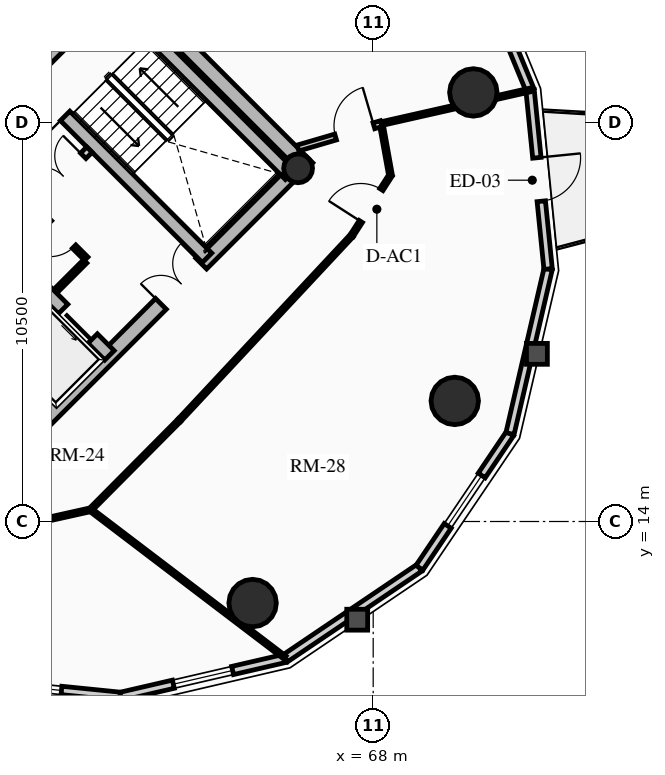
"""IFC4 building model, lengths in metres.
Left out: names, types, materials, properties, quantities, classifications, styles, units other than length and angle.
Written with IfcOpenShell. Run it as: python <this file> out.ifc"""

import sys

from ifc_helpers import new_model, si_unit, direction, frame, frame_2d, origin, origin_2d, place, context, subcontext, project, spatial, rectangle, circle, hollow_circle, extrude, source, transform, mapped, element, fill, save


model = new_model("IFC4")
c1 = context("Model", 3, precision=1e-05, world=origin(), true_north=direction((0.0, 1.0)))
c2 = subcontext(c1, "Body", "Model", "MODEL_VIEW")
j1 = project(units=[si_unit("LENGTHUNIT", "METRE"), si_unit("PLANEANGLEUNIT", "RADIAN")], contexts=[c1])
p1 = place(None, origin())
s1 = spatial("IfcSite", under=j1, at=p1, CompositionType="ELEMENT")
p2 = place(p1, origin())
s2 = spatial("IfcBuilding", under=s1, at=p2, CompositionType="ELEMENT")
p3 = place(p2, frame((0.0, 0.0, 189.43)))
s3 = spatial("IfcBuildingStorey", under=s2, at=p3, CompositionType="ELEMENT", Elevation=189.43)
p4 = place(p3, frame((66.268, 23.298, 0.0), z_axis=(0.0, 0.0, 1.0), x_axis=(-0.707106781187, 0.707106781187, 0.0)))
e1 = element("IfcWall", 1, at=p4, inside=s3, PredefinedType="SHEAR", context=c2, shape_type="SweptSolid", body=[
    extrude(rectangle(XDim=14.1, YDim=0.4, at=frame_2d((7.05, 0.0))), origin(), (0.0, 0.0, 1.0), 2.91),
])
p5 = place(p3, frame((58.561, 15.873, 0.0), z_axis=(0.0, 0.0, 1.0), x_axis=(0.707106781187, 0.707106781187, 0.0)))
e2 = element("IfcWall", 2, at=p5, inside=s3, PredefinedType="SHEAR", context=c2, shape_type="SweptSolid", body=[
    extrude(rectangle(XDim=10.7, YDim=0.4, at=frame_2d((5.35, 0.0))), origin(), (0.0, 0.0, 1.0), 2.91),
])
m1 = source(origin(), c2, "Body", "SweptSolid", [
    extrude(rectangle(XDim=1.5, YDim=2.02, at=frame_2d((0.75, 1.01))), frame((0.0, 0.21, 0.0), z_axis=(0.0, -1.0, 0.0), x_axis=(1.0, 0.0, 0.0)), (0.0, 0.0, 1.0), 0.42),
])
p6 = place(p5, frame((5.45, 0.0, 0.0)))
e3 = element("IfcOpeningElement", 3, at=p6, cuts=e2, PredefinedType="OPENING", context=c2, shape_type="MappedRepresentation", body=[
    mapped(m1, transform((0.0, 0.0, 0.0), x_axis=(1.0, 0.0, 0.0), y_axis=(0.0, 1.0, 0.0), z_axis=(0.0, 0.0, 1.0), scale=1.0)),
])
p7 = place(p3, frame((61.06, 18.373, 0.0), z_axis=(0.0, 0.0, 1.0), x_axis=(-0.707106781187, 0.707106781187, 0.0)))
e4 = element("IfcWall", 4, at=p7, inside=s3, PredefinedType="SHEAR", context=c2, shape_type="SweptSolid", body=[
    extrude(rectangle(XDim=13.7, YDim=0.35, at=frame_2d((6.85, 0.0))), origin(), (0.0, 0.0, 1.0), 2.91),
])
m2 = source(origin(), c2, "Body", "SweptSolid", [
    extrude(rectangle(XDim=1.1, YDim=2.015, at=frame_2d((0.55, 1.007))), frame((0.0, 0.185, 0.0), z_axis=(0.0, -1.0, 0.0), x_axis=(1.0, 0.0, 0.0)), (0.0, 0.0, 1.0), 0.37),
])
p8 = place(p7, frame((4.85, 0.0, 0.0)))
e5 = element("IfcOpeningElement", 5, at=p8, cuts=e4, PredefinedType="OPENING", context=c2, shape_type="MappedRepresentation", body=[
    mapped(m2, transform((0.0, 0.0, 0.0), x_axis=(1.0, 0.0, 0.0), y_axis=(0.0, 1.0, 0.0), z_axis=(0.0, 0.0, 1.0), scale=1.0)),
])
p9 = place(p7, frame((0.625, 0.0, 0.0)))
e6 = element("IfcOpeningElement", 6, at=p9, cuts=e4, PredefinedType="OPENING", context=c2, shape_type="MappedRepresentation", body=[
    mapped(m2, transform((0.0, 0.0, 0.0), x_axis=(1.0, 0.0, 0.0), y_axis=(0.0, 1.0, 0.0), z_axis=(0.0, 0.0, 1.0), scale=1.0)),
])
p10 = place(p7, frame((2.625, 0.0, 0.0)))
e7 = element("IfcOpeningElement", 7, at=p10, cuts=e4, PredefinedType="OPENING", context=c2, shape_type="MappedRepresentation", body=[
    mapped(m2, transform((0.0, 0.0, 0.0), x_axis=(1.0, 0.0, 0.0), y_axis=(0.0, 1.0, 0.0), z_axis=(0.0, 0.0, 1.0), scale=1.0)),
])
m3 = source(origin(), c2, "Body", "SweptSolid", [
    extrude(rectangle(XDim=1.15, YDim=2.02, at=frame_2d((0.575, 1.01))), frame((0.0, 0.185, 0.0), z_axis=(0.0, -1.0, 0.0), x_axis=(1.0, 0.0, 0.0)), (0.0, 0.0, 1.0), 0.37),
])
p11 = place(p7, frame((7.27, 0.0, 0.0)))
e8 = element("IfcOpeningElement", 8, at=p11, cuts=e4, PredefinedType="OPENING", context=c2, shape_type="MappedRepresentation", body=[
    mapped(m3, transform((0.0, 0.0, 0.0), x_axis=(1.0, 0.0, 0.0), y_axis=(0.0, 1.0, 0.0), z_axis=(0.0, 0.0, 1.0), scale=1.0)),
])
p12 = place(p3, frame((63.627, 20.94, 0.0), z_axis=(0.0, 0.0, 1.0), x_axis=(-0.707119496762, 0.707094065383, 0.0)))
e9 = element("IfcWall", 9, at=p12, inside=s3, PredefinedType="SHEAR", context=c2, shape_type="SweptSolid", body=[
    extrude(rectangle(XDim=9.6, YDim=0.35, at=frame_2d((4.8, 0.0))), origin(), (0.0, 0.0, 1.0), 2.91),
])
p13 = place(p12, frame((5.28, 0.0, 0.0)))
e10 = element("IfcOpeningElement", 10, at=p13, cuts=e9, PredefinedType="OPENING", context=c2, shape_type="MappedRepresentation", body=[
    mapped(m3, transform((0.0, 0.0, 0.0), x_axis=(1.0, 0.0, 0.0), y_axis=(0.0, 1.0, 0.0), z_axis=(0.0, 0.0, 1.0), scale=1.0)),
])
p14 = place(p3, frame((65.812, 23.125, 0.0), z_axis=(0.0, 0.0, 1.0), x_axis=(-0.707106781187, 0.707106781187, 0.0)))
e11 = element("IfcWall", 11, at=p14, inside=s3, PredefinedType="SHEAR", context=c2, shape_type="SweptSolid", body=[
    extrude(rectangle(XDim=6.695, YDim=0.35, at=frame_2d((3.348, 0.0))), origin(), (0.0, 0.0, 1.0), 2.91),
])
p15 = place(p3, frame((58.893, 25.674, 0.0), z_axis=(0.0, 0.0, 1.0), x_axis=(0.707106781187, 0.707106781187, 0.0)))
e12 = element("IfcWall", 12, at=p15, inside=s3, PredefinedType="SHEAR", context=c2, shape_type="SweptSolid", body=[
    extrude(rectangle(XDim=3.285, YDim=0.35, at=frame_2d((1.643, 0.0))), origin(), (0.0, 0.0, 1.0), 2.91),
])
p16 = place(p3, frame((66.024, 23.294, 0.0), z_axis=(0.0, 0.0, 1.0), x_axis=(0.707106781187, 0.707106781187, 0.0)))
e13 = element("IfcColumn", 13, at=p16, inside=s3, PredefinedType="COLUMN", context=c2, shape_type="SweptSolid", body=[
    extrude(hollow_circle(Radius=0.38, WallThickness=0.032, at=origin_2d()), origin(), (0.0, 0.0, 1.0), 2.91),
])
for number, where, z_axis, x_axis in (
    (14, (64.827, 11.854, 0.0), (0.0, 0.0, 1.0), (1.0, 0.0, 0.0)),
    (15, (70.146, 17.173, 0.0), (0.0, 0.0, 1.0), (1.0, 0.0, 0.0)),
    (16, (70.635, 25.291, 0.0), (0.0, 0.0, 1.0), (1.0, 0.0, 0.0)),
):
    element("IfcColumn", number, at=place(p3, frame(where, z_axis=z_axis, x_axis=x_axis)), inside=s3, PredefinedType="USERDEFINED", context=c2, shape_type="SweptSolid", body=[
        extrude(circle(Radius=0.625, at=origin_2d()), origin(), (0.0, 0.0, 1.0), 2.91),
    ])
p17 = place(p3, frame((61.355, 9.397, 0.0), z_axis=(0.0, 0.0, 1.0), x_axis=(-0.994943283129, 0.100438356004, 0.0)))
e17 = element("IfcWall", 17, at=p17, inside=s3, PredefinedType="SOLIDWALL", context=c2, shape_type="SweptSolid", body=[
    extrude(rectangle(XDim=4.733, YDim=0.22, at=frame_2d((2.366, 0.0))), origin(), (0.0, 0.0, 1.0), 2.125),
])
m4 = source(origin(), c2, "Body", "SweptSolid", [
    extrude(rectangle(XDim=1.6, YDim=1.3, at=frame_2d((0.8, 0.65))), frame((0.0, 0.12, 0.0), z_axis=(0.0, -1.0, 0.0), x_axis=(1.0, 0.0, 0.0)), (0.0, 0.0, 1.0), 0.24),
])
p18 = place(p17, frame((1.566, 0.0, 0.65)))
e18 = element("IfcOpeningElement", 18, at=p18, cuts=e17, PredefinedType="OPENING", context=c2, shape_type="MappedRepresentation", body=[
    mapped(m4, transform((0.0, 0.0, 0.0), x_axis=(1.0, 0.0, 0.0), y_axis=(0.0, 1.0, 0.0), z_axis=(0.0, 0.0, 1.0), scale=1.0)),
])
p19 = place(p3, frame((65.687, 10.4, 0.0), z_axis=(0.0, 0.0, 1.0), x_axis=(-0.97422620202, -0.22557328587, 0.0)))
e19 = element("IfcWall", 19, at=p19, inside=s3, PredefinedType="SOLIDWALL", context=c2, shape_type="SweptSolid", body=[
    extrude(rectangle(XDim=4.446, YDim=0.22, at=frame_2d((2.223, 0.0))), origin(), (0.0, 0.0, 1.0), 2.125),
])
p20 = place(p19, frame((1.423, 0.0, 0.65)))
e20 = element("IfcOpeningElement", 20, at=p20, cuts=e19, PredefinedType="OPENING", context=c2, shape_type="MappedRepresentation", body=[
    mapped(m4, transform((0.0, 0.0, 0.0), x_axis=(1.0, 0.0, 0.0), y_axis=(0.0, 1.0, 0.0), z_axis=(0.0, 0.0, 1.0), scale=1.0)),
])
p21 = place(p3, frame((69.217, 12.783, 0.0), z_axis=(0.0, 0.0, 1.0), x_axis=(-0.828817439852, -0.55951912514, 0.0)))
e21 = element("IfcWall", 21, at=p21, inside=s3, PredefinedType="SOLIDWALL", context=c2, shape_type="SweptSolid", body=[
    extrude(rectangle(XDim=4.259, YDim=0.22, at=frame_2d((2.129, 0.0))), origin(), (0.0, 0.0, 1.0), 2.125),
])
p22 = place(p3, frame((71.6, 16.313, 0.0), z_axis=(0.0, 0.0, 1.0), x_axis=(-0.55951912514, -0.828817439852, 0.0)))
e22 = element("IfcWall", 22, at=p22, inside=s3, PredefinedType="SOLIDWALL", context=c2, shape_type="SweptSolid", body=[
    extrude(rectangle(XDim=4.259, YDim=0.22, at=frame_2d((2.129, 0.0))), origin(), (0.0, 0.0, 1.0), 2.125),
])
p23 = place(p22, frame((1.33, 0.0, 0.65)))
e23 = element("IfcOpeningElement", 23, at=p23, cuts=e22, PredefinedType="OPENING", context=c2, shape_type="MappedRepresentation", body=[
    mapped(m4, transform((0.0, 0.0, 0.0), x_axis=(1.0, 0.0, 0.0), y_axis=(0.0, 1.0, 0.0), z_axis=(0.0, 0.0, 1.0), scale=1.0)),
])
p24 = place(p3, frame((72.603, 20.645, 0.0), z_axis=(0.0, 0.0, 1.0), x_axis=(-0.22557328587, -0.97422620202, 0.0)))
e24 = element("IfcWall", 24, at=p24, inside=s3, PredefinedType="SOLIDWALL", context=c2, shape_type="SweptSolid", body=[
    extrude(rectangle(XDim=4.446, YDim=0.22, at=frame_2d((2.223, 0.0))), origin(), (0.0, 0.0, 1.0), 2.125),
])
p25 = place(p3, frame((72.127, 25.354, 0.0), z_axis=(0.0, 0.0, 1.0), x_axis=(0.100438356004, -0.994943283129, 0.0)))
e25 = element("IfcWall", 25, at=p25, inside=s3, PredefinedType="SOLIDWALL", context=c2, shape_type="SweptSolid", body=[
    extrude(rectangle(XDim=4.733, YDim=0.22, at=frame_2d((2.366, 0.0))), origin(), (0.0, 0.0, 1.0), 2.125),
])
m5 = source(origin(), c2, "Body", "SweptSolid", [
    extrude(rectangle(XDim=1.15, YDim=2.005, at=frame_2d((0.575, 1.002))), frame((0.0, 0.12, 0.0), z_axis=(0.0, -1.0, 0.0), x_axis=(1.0, 0.0, 0.0)), (0.0, 0.0, 1.0), 0.24),
])
p26 = place(p25, frame((1.791, 0.0, 0.0)))
e26 = element("IfcOpeningElement", 26, at=p26, cuts=e25, PredefinedType="OPENING", context=c2, shape_type="MappedRepresentation", body=[
    mapped(m5, transform((0.0, 0.0, 0.0), x_axis=(1.0, 0.0, 0.0), y_axis=(0.0, 1.0, 0.0), z_axis=(0.0, 0.0, 1.0), scale=1.0)),
])
p27 = place(p3, frame((70.22, 29.979, 0.0), z_axis=(0.0, 0.0, 1.0), x_axis=(0.381196434348, -0.924494066201, 0.0)))
e27 = element("IfcWall", 27, at=p27, inside=s3, PredefinedType="SOLIDWALL", context=c2, shape_type="SweptSolid", body=[
    extrude(rectangle(XDim=5.003, YDim=0.22, at=frame_2d((2.501, 0.0))), origin(), (0.0, 0.0, 1.0), 2.125),
])
p28 = place(p3, frame((58.214, 21.467, 0.0), z_axis=(0.0, 0.0, 1.0), x_axis=(0.707106781187, 0.707106781187, 0.0)))
e28 = element("IfcWall", 28, at=p28, inside=s3, PredefinedType="PARTITIONING", context=c2, shape_type="SweptSolid", body=[
    extrude(rectangle(XDim=3.28, YDim=0.2, at=frame_2d((1.64, 0.0))), origin(), (0.0, 0.0, 1.0), 2.555),
])
m6 = source(origin(), c2, "Body", "SweptSolid", [
    extrude(rectangle(XDim=1.5, YDim=2.02, at=frame_2d((0.75, 1.01))), frame((0.0, 0.11, 0.0), z_axis=(0.0, -1.0, 0.0), x_axis=(1.0, 0.0, 0.0)), (0.0, 0.0, 1.0), 0.22),
])
p29 = place(p28, frame((1.55, 0.0, 0.0)))
e29 = element("IfcOpeningElement", 29, at=p29, cuts=e28, PredefinedType="OPENING", context=c2, shape_type="MappedRepresentation", body=[
    mapped(m6, transform((0.0, 0.0, 0.0), x_axis=(1.0, 0.0, 0.0), y_axis=(0.0, 1.0, 0.0), z_axis=(0.0, 0.0, 1.0), scale=1.0)),
])
p30 = place(p3, frame((60.448, 20.915, 0.0), z_axis=(0.0, 0.0, 1.0), x_axis=(-0.707106781187, 0.707106781187, 0.0)))
e30 = element("IfcWall", 30, at=p30, inside=s3, PredefinedType="PARTITIONING", context=c2, shape_type="SweptSolid", body=[
    extrude(rectangle(XDim=1.87, YDim=0.125, at=frame_2d((0.935, 0.0))), origin(), (0.0, 0.0, 1.0), 2.555),
])
m7 = source(origin(), c2, "Body", "SweptSolid", [
    extrude(rectangle(XDim=0.9, YDim=2.005, at=frame_2d((0.45, 1.002))), frame((0.0, 0.073, 0.0), z_axis=(0.0, -1.0, 0.0), x_axis=(1.0, 0.0, 0.0)), (0.0, 0.0, 1.0), 0.145),
])
p31 = place(p30, frame((0.45, 0.0, 0.0)))
e31 = element("IfcOpeningElement", 31, at=p31, cuts=e30, PredefinedType="OPENING", context=c2, shape_type="MappedRepresentation", body=[
    mapped(m7, transform((0.0, 0.0, 0.0), x_axis=(1.0, 0.0, 0.0), y_axis=(0.0, 1.0, 0.0), z_axis=(0.0, 0.0, 1.0), scale=1.0)),
])
p32 = place(p3, frame((59.643, 20.066, 0.0), z_axis=(0.0, 0.0, 1.0), x_axis=(0.707106781187, 0.707106781187, 0.0)))
e32 = element("IfcWall", 32, at=p32, inside=s3, PredefinedType="PARTITIONING", context=c2, shape_type="SweptSolid", body=[
    extrude(rectangle(XDim=1.1, YDim=0.125, at=frame_2d((0.55, 0.0))), origin(), (0.0, 0.0, 1.0), 2.555),
])
p33 = place(p3, frame((59.008, 13.963, 0.0), z_axis=(0.0, 0.0, 1.0), x_axis=(0.976020856791, 0.21767702476, 0.0)))
e33 = element("IfcWall", 33, at=p33, inside=s3, PredefinedType="MOVABLE", context=c2, shape_type="SweptSolid", body=[
    extrude(rectangle(XDim=1.593, YDim=0.1, at=frame_2d((0.796, 0.0))), origin(), (0.0, 0.0, 1.0), 2.125),
])
p34 = place(p3, frame((60.562, 14.31, 0.0), z_axis=(0.0, 0.0, 1.0), x_axis=(0.704566236161, 0.709638230975, 0.0)))
e34 = element("IfcWall", 34, at=p34, inside=s3, PredefinedType="MOVABLE", context=c2, shape_type="SweptSolid", body=[
    extrude(rectangle(XDim=3.321, YDim=0.1, at=frame_2d((1.661, 0.0))), origin(), (0.0, 0.0, 1.0), 2.125),
])
p35 = place(p3, frame((62.903, 16.667, 0.0), z_axis=(0.0, 0.0, 1.0), x_axis=(0.682371947497, 0.731005147225, 0.0)))
e35 = element("IfcWall", 35, at=p35, inside=s3, PredefinedType="MOVABLE", context=c2, shape_type="SweptSolid", body=[
    extrude(rectangle(XDim=6.642, YDim=0.1, at=frame_2d((3.321, 0.0))), origin(), (0.0, 0.0, 1.0), 2.125),
])
p36 = place(p3, frame((67.435, 21.521, 0.0), z_axis=(0.0, 0.0, 1.0), x_axis=(0.540777197838, 0.841165870859, 0.0)))
e36 = element("IfcWall", 36, at=p36, inside=s3, PredefinedType="MOVABLE", context=c2, shape_type="SweptSolid", body=[
    extrude(rectangle(XDim=1.888, YDim=0.1, at=frame_2d((0.944, 0.0))), origin(), (0.0, 0.0, 1.0), 2.125),
])
m8 = source(origin(), c2, "Body", "SweptSolid", [
    extrude(rectangle(XDim=1.0, YDim=2.015, at=frame_2d((0.5, 1.007))), frame((0.0, 0.06, 0.0), z_axis=(0.0, -1.0, 0.0), x_axis=(1.0, 0.0, 0.0)), (0.0, 0.0, 1.0), 0.12),
])
p37 = place(p36, frame((0.444, 0.0, 0.0)))
e37 = element("IfcOpeningElement", 37, at=p37, cuts=e36, PredefinedType="OPENING", context=c2, shape_type="MappedRepresentation", body=[
    mapped(m8, transform((0.0, 0.0, 0.0), x_axis=(1.0, 0.0, 0.0), y_axis=(0.0, 1.0, 0.0), z_axis=(0.0, 0.0, 1.0), scale=1.0)),
])
p38 = place(p3, frame((68.456, 23.11, 0.0), z_axis=(0.0, 0.0, 1.0), x_axis=(-0.1772522795, 0.984165448191, 0.0)))
e38 = element("IfcWall", 38, at=p38, inside=s3, PredefinedType="MOVABLE", context=c2, shape_type="SweptSolid", body=[
    extrude(rectangle(XDim=1.382, YDim=0.1, at=frame_2d((0.691, 0.0))), origin(), (0.0, 0.0, 1.0), 2.125),
])
p39 = place(p3, frame((60.562, 14.31, 0.0), z_axis=(0.0, 0.0, 1.0), x_axis=(0.795846601014, -0.605498296987, 0.0)))
e39 = element("IfcWall", 39, at=p39, inside=s3, PredefinedType="MOVABLE", context=c2, shape_type="SweptSolid", body=[
    extrude(rectangle(XDim=6.427, YDim=0.1, at=frame_2d((3.213, 0.0))), origin(), (0.0, 0.0, 1.0), 2.125),
])
p40 = place(p3, frame((68.211, 24.469, 0.0), z_axis=(0.0, 0.0, 1.0), x_axis=(0.975366409574, 0.220590949666, 0.0)))
e40 = element("IfcWall", 40, at=p40, inside=s3, PredefinedType="MOVABLE", context=c2, shape_type="SweptSolid", body=[
    extrude(rectangle(XDim=3.995, YDim=0.1, at=frame_2d((1.998, 0.0))), origin(), (0.0, 0.0, 1.0), 2.125),
])
p41 = place(p3, frame((66.021, 23.828, 0.0), z_axis=(0.0, 0.0, 1.0), x_axis=(0.959727558294, 0.280932400856, 0.0)))
e41 = element("IfcWall", 41, at=p41, inside=s3, PredefinedType="PARTITIONING", context=c2, shape_type="SweptSolid", body=[
    extrude(rectangle(XDim=2.282, YDim=0.16, at=frame_2d((1.141, 0.0))), origin(), (0.0, 0.0, 1.0), 2.125),
])
m9 = source(origin(), c2, "Body", "SweptSolid", [
    extrude(rectangle(XDim=1.05, YDim=2.015, at=frame_2d((0.525, 1.007))), frame((0.0, 0.09, 0.0), z_axis=(0.0, -1.0, 0.0), x_axis=(1.0, 0.0, 0.0)), (0.0, 0.0, 1.0), 0.18),
])
p42 = place(p41, frame((1.032, 0.0, 0.0)))
e42 = element("IfcOpeningElement", 42, at=p42, cuts=e41, PredefinedType="OPENING", context=c2, shape_type="MappedRepresentation", body=[
    mapped(m9, transform((0.0, 0.0, 0.0), x_axis=(1.0, 0.0, 0.0), y_axis=(0.0, 1.0, 0.0), z_axis=(0.0, 0.0, 1.0), scale=1.0)),
])
m10 = source(origin(), c2, "Body", "SweptSolid", [
    extrude(rectangle(XDim=1.6, YDim=1.3, at=frame_2d((0.8, 0.65))), frame((0.0, 0.03, 0.0), z_axis=(0.0, -1.0, 0.0), x_axis=(1.0, 0.0, 0.0)), (0.0, 0.0, 1.0), 0.06),
])
p43 = place(p18, origin())
e43 = element("IfcWindow", 43, at=p43, inside=s3, PartitioningType="SINGLE_PANEL", PredefinedType="WINDOW", context=c2, shape_type="MappedRepresentation", body=[
    mapped(m10, transform((0.0, 0.0, 0.0), x_axis=(1.0, 0.0, 0.0), y_axis=(0.0, 1.0, 0.0), z_axis=(0.0, 0.0, 1.0), scale=1.0)),
])
fill(e18, e43)
p44 = place(p20, origin())
e44 = element("IfcWindow", 44, at=p44, inside=s3, PartitioningType="SINGLE_PANEL", PredefinedType="WINDOW", context=c2, shape_type="MappedRepresentation", body=[
    mapped(m10, transform((0.0, 0.0, 0.0), x_axis=(1.0, 0.0, 0.0), y_axis=(0.0, 1.0, 0.0), z_axis=(0.0, 0.0, 1.0), scale=1.0)),
])
fill(e20, e44)
p45 = place(p23, origin())
e45 = element("IfcWindow", 45, at=p45, inside=s3, PartitioningType="SINGLE_PANEL", PredefinedType="WINDOW", context=c2, shape_type="MappedRepresentation", body=[
    mapped(m10, transform((0.0, 0.0, 0.0), x_axis=(1.0, 0.0, 0.0), y_axis=(0.0, 1.0, 0.0), z_axis=(0.0, 0.0, 1.0), scale=1.0)),
])
fill(e23, e45)
m11 = source(origin(), c2, "Body", "SweptSolid", [
    extrude(rectangle(XDim=1.15, YDim=2.005, at=frame_2d((0.575, 1.002))), frame((0.0, 0.025, 0.0), z_axis=(0.0, -1.0, 0.0), x_axis=(1.0, 0.0, 0.0)), (0.0, 0.0, 1.0), 0.05),
])
p46 = place(p26, origin())
e46 = element("IfcDoor", 46, at=p46, inside=s3, OperationType="SINGLE_SWING_LEFT", PredefinedType="DOOR", context=c2, shape_type="MappedRepresentation", body=[
    mapped(m11, transform((0.0, 0.0, 0.0), x_axis=(1.0, 0.0, 0.0), y_axis=(0.0, 1.0, 0.0), z_axis=(0.0, 0.0, 1.0), scale=1.0)),
])
fill(e26, e46)
m12 = source(origin(), c2, "Body", "SweptSolid", [
    extrude(rectangle(XDim=1.1, YDim=2.015, at=frame_2d((0.55, 1.007))), frame((0.0, 0.025, 0.0), z_axis=(0.0, -1.0, 0.0), x_axis=(1.0, 0.0, 0.0)), (0.0, 0.0, 1.0), 0.05),
])
p47 = place(p9, origin())
e47 = element("IfcDoor", 47, at=p47, inside=s3, OperationType="SLIDING_TO_LEFT", PredefinedType="DOOR", context=c2, shape_type="MappedRepresentation", body=[
    mapped(m12, transform((0.0, 0.0, 0.0), x_axis=(1.0, 0.0, 0.0), y_axis=(0.0, 1.0, 0.0), z_axis=(0.0, 0.0, 1.0), scale=1.0)),
])
fill(e6, e47)
m13 = source(origin(), c2, "Body", "SweptSolid", [
    extrude(rectangle(XDim=1.15, YDim=2.02, at=frame_2d((0.575, 1.01))), frame((0.0, 0.025, 0.0), z_axis=(0.0, -1.0, 0.0), x_axis=(1.0, 0.0, 0.0)), (0.0, 0.0, 1.0), 0.05),
])
p48 = place(p13, origin())
e48 = element("IfcDoor", 48, at=p48, inside=s3, OperationType="SINGLE_SWING_LEFT", PredefinedType="DOOR", context=c2, shape_type="MappedRepresentation", body=[
    mapped(m13, transform((0.0, 0.0, 0.0), x_axis=(1.0, 0.0, 0.0), y_axis=(0.0, 1.0, 0.0), z_axis=(0.0, 0.0, 1.0), scale=1.0)),
])
fill(e10, e48)
m14 = source(origin(), c2, "Body", "SweptSolid", [
    extrude(rectangle(XDim=1.5, YDim=2.02, at=frame_2d((0.75, 1.01))), frame((0.0, 0.025, 0.0), z_axis=(0.0, -1.0, 0.0), x_axis=(1.0, 0.0, 0.0)), (0.0, 0.0, 1.0), 0.05),
])
p49 = place(p6, origin())
e49 = element("IfcDoor", 49, at=p49, inside=s3, OperationType="DOUBLE_DOOR_SINGLE_SWING", PredefinedType="DOOR", context=c2, shape_type="MappedRepresentation", body=[
    mapped(m14, transform((0.0, 0.0, 0.0), x_axis=(1.0, 0.0, 0.0), y_axis=(0.0, 1.0, 0.0), z_axis=(0.0, 0.0, 1.0), scale=1.0)),
])
fill(e3, e49)
p50 = place(p29, origin())
e50 = element("IfcDoor", 50, at=p50, inside=s3, OperationType="DOUBLE_DOOR_SINGLE_SWING", PredefinedType="DOOR", context=c2, shape_type="MappedRepresentation", body=[
    mapped(m14, transform((0.0, 0.0, 0.0), x_axis=(1.0, 0.0, 0.0), y_axis=(0.0, 1.0, 0.0), z_axis=(0.0, 0.0, 1.0), scale=1.0)),
])
fill(e29, e50)
m15 = source(origin(), c2, "Body", "SweptSolid", [
    extrude(rectangle(XDim=0.9, YDim=2.005, at=frame_2d((0.45, 1.002))), frame((0.0, 0.025, 0.0), z_axis=(0.0, -1.0, 0.0), x_axis=(1.0, 0.0, 0.0)), (0.0, 0.0, 1.0), 0.05),
])
p51 = place(p31, origin())
e51 = element("IfcDoor", 51, at=p51, inside=s3, OperationType="SINGLE_SWING_RIGHT", PredefinedType="DOOR", context=c2, shape_type="MappedRepresentation", body=[
    mapped(m15, transform((0.0, 0.0, 0.0), x_axis=(1.0, 0.0, 0.0), y_axis=(0.0, 1.0, 0.0), z_axis=(0.0, 0.0, 1.0), scale=1.0)),
])
fill(e31, e51)
m16 = source(origin(), c2, "Body", "SweptSolid", [
    extrude(rectangle(XDim=1.05, YDim=2.015, at=frame_2d((0.525, 1.007))), frame((0.0, 0.025, 0.0), z_axis=(0.0, -1.0, 0.0), x_axis=(1.0, 0.0, 0.0)), (0.0, 0.0, 1.0), 0.05),
])
p52 = place(p42, origin())
e52 = element("IfcDoor", 52, at=p52, inside=s3, OperationType="SINGLE_SWING_RIGHT", PredefinedType="DOOR", context=c2, shape_type="MappedRepresentation", body=[
    mapped(m16, transform((0.0, 0.0, 0.0), x_axis=(1.0, 0.0, 0.0), y_axis=(0.0, 1.0, 0.0), z_axis=(0.0, 0.0, 1.0), scale=1.0)),
])
fill(e42, e52)
m17 = source(origin(), c2, "Body", "SweptSolid", [
    extrude(rectangle(XDim=1.0, YDim=2.015, at=frame_2d((0.5, 1.007))), frame((0.0, 0.025, 0.0), z_axis=(0.0, -1.0, 0.0), x_axis=(1.0, 0.0, 0.0)), (0.0, 0.0, 1.0), 0.05),
])
p53 = place(p37, origin())
e53 = element("IfcDoor", 53, at=p53, inside=s3, OperationType="SINGLE_SWING_LEFT", PredefinedType="DOOR", context=c2, shape_type="MappedRepresentation", body=[
    mapped(m17, transform((0.0, 0.0, 0.0), x_axis=(1.0, 0.0, 0.0), y_axis=(0.0, 1.0, 0.0), z_axis=(0.0, 0.0, 1.0), scale=1.0)),
])
fill(e37, e53)
save(model, sys.argv[1])
